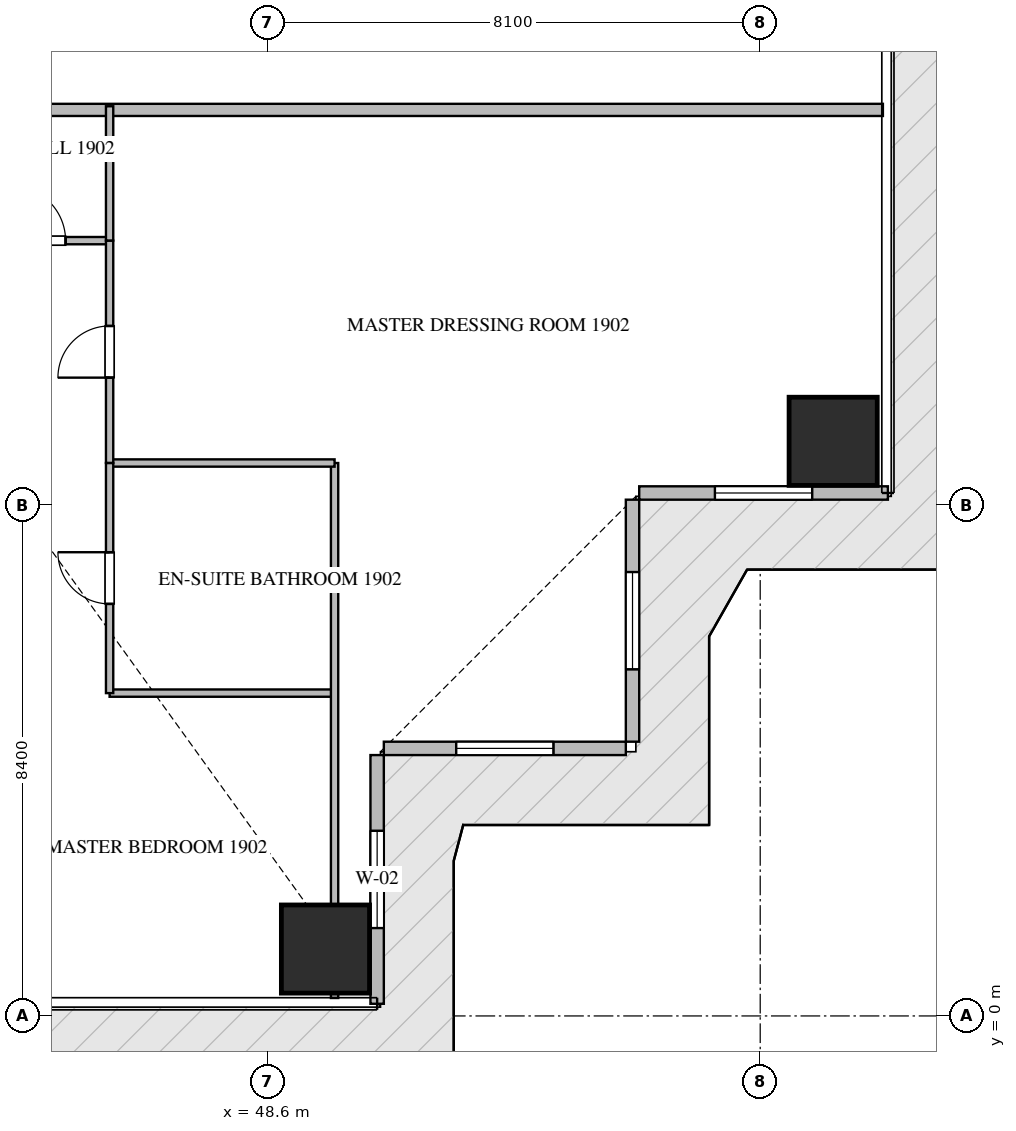
"""IFC4 building model, lengths in metres.
Left out: names, types, materials, properties, quantities, classifications, styles, units other than length and angle.
Written with IfcOpenShell. Run it as: python <this file> out.ifc"""

import sys

from ifc_helpers import new_model, si_unit, direction, frame, frame_2d, origin, origin_2d, place, context, subcontext, project, spatial, rectangle, extrude, source, transform, mapped, element, fill, save


model = new_model("IFC4")
c1 = context("Model", 3, precision=1e-05, world=origin(), true_north=direction((0.0, 1.0)))
c2 = subcontext(c1, "Body", "Model", "MODEL_VIEW")
j1 = project(units=[si_unit("LENGTHUNIT", "METRE"), si_unit("PLANEANGLEUNIT", "RADIAN")], contexts=[c1])
p1 = place(None, origin())
s1 = spatial("IfcSite", under=j1, at=p1, CompositionType="ELEMENT")
p2 = place(p1, origin())
s2 = spatial("IfcBuilding", under=s1, at=p2, CompositionType="ELEMENT")
p3 = place(p2, frame((0.0, 0.0, 79.2)))
s3 = spatial("IfcBuildingStorey", under=s2, at=p3, CompositionType="ELEMENT", Elevation=79.2)
m1 = source(origin(), c2, "Body", "SweptSolid", [
    extrude(rectangle(XDim=1.45, YDim=1.45, at=origin_2d()), origin(), (0.0, 0.0, 1.0), 3.75),
])
for number, where, z_axis, x_axis in (
    (1, (49.55, 1.1, -0.26), (0.0, 0.0, 1.0), (1.0, 0.0, 0.0)),
    (2, (57.9, 9.45, -0.26), (0.0, 0.0, 1.0), (1.0, 0.0, 0.0)),
):
    element("IfcColumn", number, at=place(p3, frame(where, z_axis=z_axis, x_axis=x_axis)), inside=s3, PredefinedType="COLUMN", context=c2, shape_type="MappedRepresentation", body=[
        mapped(m1, transform((0.0, 0.0, 0.0), scale=1.0)),
    ])
p4 = place(p3, frame((50.4, 0.2, 0.0), z_axis=(0.0, 0.0, 1.0), x_axis=(0.0, 1.0, 0.0)))
e3 = element("IfcWall", 3, at=p4, inside=s3, PredefinedType="ELEMENTEDWALL", context=c2, shape_type="SweptSolid", body=[
    extrude(rectangle(XDim=4.09, YDim=0.22, at=frame_2d((2.045, 0.0))), origin(), (0.0, 0.0, 1.0), 3.475),
])
p5 = place(p4, frame((1.245, 0.0, 0.65)))
e4 = element("IfcOpeningElement", 4, at=p5, cuts=e3, PredefinedType="OPENING", context=c2, shape_type="SweptSolid", body=[
    extrude(rectangle(XDim=1.6, YDim=2.1, at=frame_2d((0.8, 1.05))), frame((0.0, 0.12, 0.0), z_axis=(0.0, -1.0, 0.0), x_axis=(1.0, 0.0, 0.0)), (0.0, 0.0, 1.0), 0.24),
])
p6 = place(p3, frame((50.51, 4.4, 0.0), z_axis=(0.0, 0.0, 1.0), x_axis=(1.0, 0.0, 0.0)))
e5 = element("IfcWall", 5, at=p6, inside=s3, PredefinedType="ELEMENTEDWALL", context=c2, shape_type="SweptSolid", body=[
    extrude(rectangle(XDim=3.98, YDim=0.22, at=frame_2d((1.99, 0.0))), origin(), (0.0, 0.0, 1.0), 3.475),
])
p7 = place(p6, frame((1.19, 0.0, 0.65)))
e6 = element("IfcOpeningElement", 6, at=p7, cuts=e5, PredefinedType="OPENING", context=c2, shape_type="SweptSolid", body=[
    extrude(rectangle(XDim=1.6, YDim=2.1, at=frame_2d((0.8, 1.05))), frame((0.0, 0.12, 0.0), z_axis=(0.0, -1.0, 0.0), x_axis=(1.0, 0.0, 0.0)), (0.0, 0.0, 1.0), 0.24),
])
p8 = place(p3, frame((54.6, 4.51, 0.0), z_axis=(0.0, 0.0, 1.0), x_axis=(0.0, 1.0, 0.0)))
e7 = element("IfcWall", 7, at=p8, inside=s3, PredefinedType="ELEMENTEDWALL", context=c2, shape_type="SweptSolid", body=[
    extrude(rectangle(XDim=3.98, YDim=0.22, at=frame_2d((1.99, 0.0))), origin(), (0.0, 0.0, 1.0), 3.475),
])
p9 = place(p8, frame((1.19, 0.0, 0.65)))
e8 = element("IfcOpeningElement", 8, at=p9, cuts=e7, PredefinedType="OPENING", context=c2, shape_type="SweptSolid", body=[
    extrude(rectangle(XDim=1.6, YDim=2.1, at=frame_2d((0.8, 1.05))), frame((0.0, 0.12, 0.0), z_axis=(0.0, -1.0, 0.0), x_axis=(1.0, 0.0, 0.0)), (0.0, 0.0, 1.0), 0.24),
])
p10 = place(p3, frame((54.71, 8.6, 0.0), z_axis=(0.0, 0.0, 1.0), x_axis=(1.0, 0.0, 0.0)))
e9 = element("IfcWall", 9, at=p10, inside=s3, PredefinedType="ELEMENTEDWALL", context=c2, shape_type="SweptSolid", body=[
    extrude(rectangle(XDim=4.09, YDim=0.22, at=frame_2d((2.045, 0.0))), origin(), (0.0, 0.0, 1.0), 3.475),
])
p11 = place(p10, frame((1.245, 0.0, 0.65)))
e10 = element("IfcOpeningElement", 10, at=p11, cuts=e9, PredefinedType="OPENING", context=c2, shape_type="SweptSolid", body=[
    extrude(rectangle(XDim=1.6, YDim=2.1, at=frame_2d((0.8, 1.05))), frame((0.0, 0.12, 0.0), z_axis=(0.0, -1.0, 0.0), x_axis=(1.0, 0.0, 0.0)), (0.0, 0.0, 1.0), 0.24),
])
p12 = place(p3, frame((43.4, 14.9, 0.0), z_axis=(0.0, 0.0, 1.0), x_axis=(1.0, 0.0, 0.0)))
e11 = element("IfcWall", 11, at=p12, inside=s3, PredefinedType="PARTITIONING", context=c2, shape_type="SweptSolid", body=[
    extrude(rectangle(XDim=15.318, YDim=0.2, at=frame_2d((7.659, 0.0))), origin(), (0.0, 0.0, 1.0), 3.49),
])
p13 = place(p3, frame((43.652, 12.75, 0.0), z_axis=(0.0, 0.0, 1.0), x_axis=(1.0, 0.0, 0.0)))
e12 = element("IfcWall", 12, at=p13, inside=s3, PredefinedType="PARTITIONING", context=c2, shape_type="SweptSolid", body=[
    extrude(rectangle(XDim=2.348, YDim=0.12, at=frame_2d((1.174, 0.0))), origin(), (0.0, 0.0, 1.0), 3.49),
])
p14 = place(p13, frame((0.724, 0.0, 0.0)))
e13 = element("IfcOpeningElement", 13, at=p14, cuts=e12, PredefinedType="OPENING", context=c2, shape_type="SweptSolid", body=[
    extrude(rectangle(XDim=0.9, YDim=2.1, at=frame_2d((0.45, 1.05))), frame((0.0, 0.07, 0.0), z_axis=(0.0, -1.0, 0.0), x_axis=(1.0, 0.0, 0.0)), (0.0, 0.0, 1.0), 0.14),
])
p15 = place(p3, frame((46.0, 5.309, 0.0), z_axis=(0.0, 0.0, 1.0), x_axis=(1.0, 0.0, 0.0)))
e14 = element("IfcWall", 14, at=p15, inside=s3, PredefinedType="PARTITIONING", context=c2, shape_type="SweptSolid", body=[
    extrude(rectangle(XDim=3.7, YDim=0.12, at=frame_2d((1.85, 0.0))), origin(), (0.0, 0.0, 1.0), 3.49),
])
p16 = place(p3, frame((49.7, 0.295, 0.0), z_axis=(0.0, 0.0, 1.0), x_axis=(0.0, 1.0, 0.0)))
e15 = element("IfcWall", 15, at=p16, inside=s3, PredefinedType="PARTITIONING", context=c2, shape_type="SweptSolid", body=[
    extrude(rectangle(XDim=8.798, YDim=0.12, at=frame_2d((4.399, 0.0))), origin(), (0.0, 0.0, 1.0), 2.922),
])
p17 = place(p3, frame((46.0, 9.093, 0.0), z_axis=(0.0, 0.0, 1.0), x_axis=(1.0, 0.0, 0.0)))
e16 = element("IfcWall", 16, at=p17, inside=s3, PredefinedType="PARTITIONING", context=c2, shape_type="SweptSolid", body=[
    extrude(rectangle(XDim=3.7, YDim=0.12, at=frame_2d((1.85, 0.0))), origin(), (0.0, 0.0, 1.0), 3.49),
])
p18 = place(p3, frame((46.0, 5.309, 0.0), z_axis=(0.0, 0.0, 1.0), x_axis=(0.0, 1.0, 0.0)))
e17 = element("IfcWall", 17, at=p18, inside=s3, PredefinedType="PARTITIONING", context=c2, shape_type="SweptSolid", body=[
    extrude(rectangle(XDim=3.784, YDim=0.12, at=frame_2d((1.892, 0.0))), origin(), (0.0, 0.0, 1.0), 3.49),
])
p19 = place(p18, frame((1.467, 0.0, 0.0)))
e18 = element("IfcOpeningElement", 18, at=p19, cuts=e17, PredefinedType="OPENING", context=c2, shape_type="SweptSolid", body=[
    extrude(rectangle(XDim=0.85, YDim=2.1, at=frame_2d((0.425, 1.05))), frame((0.0, 0.07, 0.0), z_axis=(0.0, -1.0, 0.0), x_axis=(1.0, 0.0, 0.0)), (0.0, 0.0, 1.0), 0.14),
])
p20 = place(p3, frame((46.0, 9.095, 0.0), z_axis=(0.0, 0.0, 1.0), x_axis=(0.0, 1.0, 0.0)))
e19 = element("IfcWall", 19, at=p20, inside=s3, PredefinedType="PARTITIONING", context=c2, shape_type="SweptSolid", body=[
    extrude(rectangle(XDim=3.655, YDim=0.12, at=frame_2d((1.828, 0.0))), origin(), (0.0, 0.0, 1.0), 3.49),
])
p21 = place(p20, frame((1.402, 0.0, 0.0)))
e20 = element("IfcOpeningElement", 20, at=p21, cuts=e19, PredefinedType="OPENING", context=c2, shape_type="SweptSolid", body=[
    extrude(rectangle(XDim=0.85, YDim=2.1, at=frame_2d((0.425, 1.05))), frame((0.0, 0.07, 0.0), z_axis=(0.0, -1.0, 0.0), x_axis=(1.0, 0.0, 0.0)), (0.0, 0.0, 1.0), 0.14),
])
p22 = place(p3, frame((46.0, 12.752, 0.0), z_axis=(0.0, 0.0, 1.0), x_axis=(0.0, 1.0, 0.0)))
e21 = element("IfcWall", 21, at=p22, inside=s3, PredefinedType="PARTITIONING", context=c2, shape_type="SweptSolid", body=[
    extrude(rectangle(XDim=2.208, YDim=0.12, at=frame_2d((1.104, 0.0))), origin(), (0.0, 0.0, 1.0), 3.49),
])
m2 = source(origin(), c2, "Body", "SweptSolid", [
    extrude(rectangle(XDim=1.6, YDim=2.1, at=frame_2d((0.8, 1.05))), frame((0.0, 0.03, 0.0), z_axis=(0.0, -1.0, 0.0), x_axis=(1.0, 0.0, 0.0)), (0.0, 0.0, 1.0), 0.06),
])
p23 = place(p5, origin())
e22 = element("IfcWindow", 22, at=p23, inside=s3, PartitioningType="SINGLE_PANEL", PredefinedType="WINDOW", context=c2, shape_type="MappedRepresentation", body=[
    mapped(m2, transform((0.0, 0.0, 0.0), scale=1.0)),
])
fill(e4, e22)
p24 = place(p7, origin())
e23 = element("IfcWindow", 23, at=p24, inside=s3, PartitioningType="SINGLE_PANEL", PredefinedType="WINDOW", context=c2, shape_type="MappedRepresentation", body=[
    mapped(m2, transform((0.0, 0.0, 0.0), scale=1.0)),
])
fill(e6, e23)
p25 = place(p9, origin())
e24 = element("IfcWindow", 24, at=p25, inside=s3, PartitioningType="SINGLE_PANEL", PredefinedType="WINDOW", context=c2, shape_type="MappedRepresentation", body=[
    mapped(m2, transform((0.0, 0.0, 0.0), scale=1.0)),
])
fill(e8, e24)
p26 = place(p11, origin())
e25 = element("IfcWindow", 25, at=p26, inside=s3, PartitioningType="SINGLE_PANEL", PredefinedType="WINDOW", context=c2, shape_type="MappedRepresentation", body=[
    mapped(m2, transform((0.0, 0.0, 0.0), scale=1.0)),
])
fill(e10, e25)
m3 = source(origin(), c2, "Body", "SweptSolid", [
    extrude(rectangle(XDim=0.9, YDim=2.1, at=frame_2d((0.45, 1.05))), frame((0.0, 0.025, 0.0), z_axis=(0.0, -1.0, 0.0), x_axis=(1.0, 0.0, 0.0)), (0.0, 0.0, 1.0), 0.05),
])
p27 = place(p14, origin())
e26 = element("IfcDoor", 26, at=p27, inside=s3, OperationType="SINGLE_SWING_LEFT", PredefinedType="DOOR", context=c2, shape_type="MappedRepresentation", body=[
    mapped(m3, transform((0.0, 0.0, 0.0), scale=1.0)),
])
fill(e13, e26)
m4 = source(origin(), c2, "Body", "SweptSolid", [
    extrude(rectangle(XDim=0.85, YDim=2.1, at=frame_2d((0.425, 1.05))), frame((0.0, 0.025, 0.0), z_axis=(0.0, -1.0, 0.0), x_axis=(1.0, 0.0, 0.0)), (0.0, 0.0, 1.0), 0.05),
])
p28 = place(p19, origin())
e27 = element("IfcDoor", 27, at=p28, inside=s3, OperationType="SINGLE_SWING_RIGHT", PredefinedType="DOOR", context=c2, shape_type="MappedRepresentation", body=[
    mapped(m4, transform((0.0, 0.0, 0.0), scale=1.0)),
])
fill(e18, e27)
p29 = place(p21, origin())
e28 = element("IfcDoor", 28, at=p29, inside=s3, OperationType="SINGLE_SWING_LEFT", PredefinedType="DOOR", context=c2, shape_type="MappedRepresentation", body=[
    mapped(m4, transform((0.0, 0.0, 0.0), scale=1.0)),
])
fill(e20, e28)
save(model, sys.argv[1])
